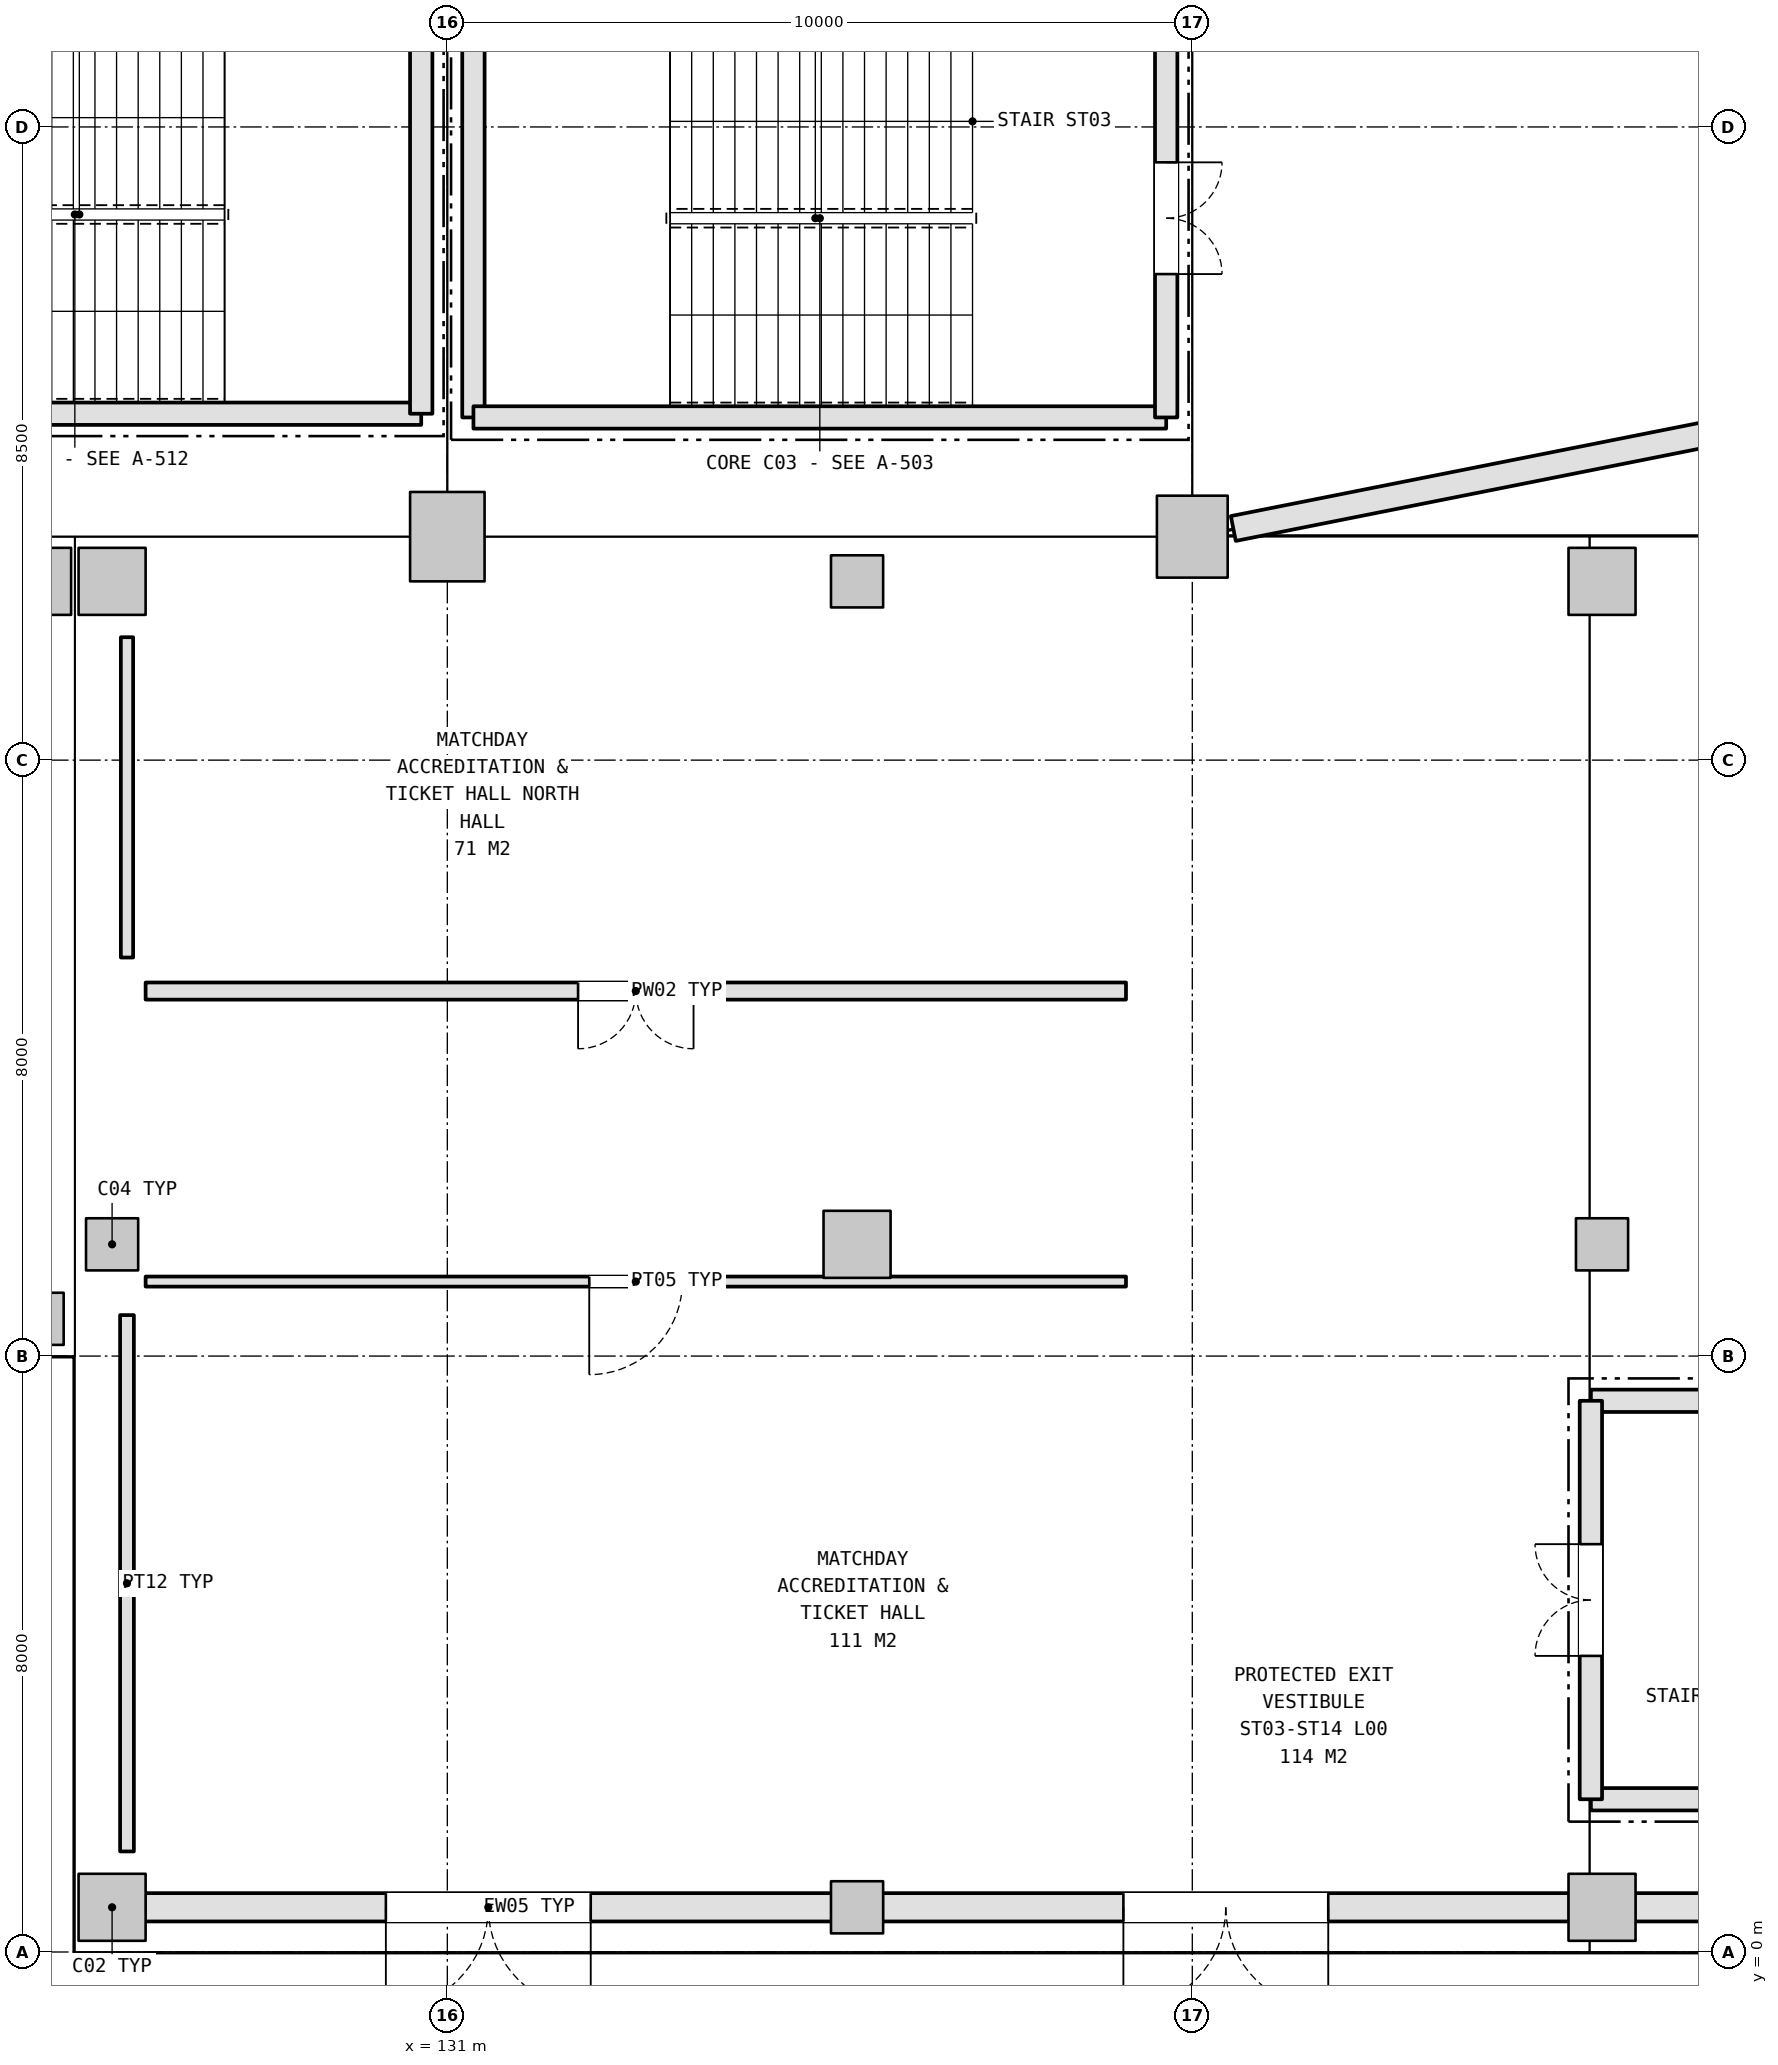
"""IFC4 building model, lengths in metres.
Left out: names, types, materials, properties, quantities, classifications, styles, units other than length and angle.
Written with IfcOpenShell. Run it as: python <this file> out.ifc"""

import sys

from ifc_helpers import new_model, si_unit, direction, frame, frame_2d, origin, origin_2d, place, context, subcontext, project, spatial, rectangle, extrude, element, fill, save


model = new_model("IFC4")
c1 = context("Model", 3, precision=1e-05, world=origin(), true_north=direction((0.0, 1.0)))
c2 = subcontext(c1, "Body", "Model", "MODEL_VIEW")
j1 = project(units=[si_unit("LENGTHUNIT", "METRE"), si_unit("PLANEANGLEUNIT", "RADIAN")], contexts=[c1])
p1 = place(None, origin())
s1 = spatial("IfcSite", under=j1, at=p1, CompositionType="ELEMENT")
p2 = place(p1, origin())
s2 = spatial("IfcBuilding", under=s1, at=p2, CompositionType="ELEMENT")
p3 = place(p2, origin())
s3 = spatial("IfcBuildingStorey", under=s2, at=p3, CompositionType="ELEMENT", Elevation=0.0)
p4 = place(p3, frame((131.0, 19.0, 0.0), z_axis=(0.0, 0.0, 1.0), x_axis=(1.0, 0.0, 0.0)))
e1 = element("IfcColumn", 1, at=p4, inside=s3, PredefinedType="COLUMN", context=c2, shape_type="SweptSolid", body=[
    extrude(rectangle(XDim=1.0, YDim=1.2, at=origin_2d()), origin(), (0.0, 0.0, 1.0), 5.4),
])
p5 = place(p3, frame((141.0, 19.0, 0.0), z_axis=(0.0, 0.0, 1.0), x_axis=(1.0, 0.0, 0.0)))
e2 = element("IfcColumn", 2, at=p5, inside=s3, PredefinedType="COLUMN", context=c2, shape_type="SweptSolid", body=[
    extrude(rectangle(XDim=0.95, YDim=1.1, at=origin_2d()), origin(), (0.0, 0.0, 1.0), 5.4),
])
p6 = place(p3, frame((126.5, 0.6, 0.0), z_axis=(0.0, 0.0, 1.0), x_axis=(1.0, 0.0, 0.0)))
e3 = element("IfcColumn", 3, at=p6, inside=s3, PredefinedType="COLUMN", context=c2, shape_type="SweptSolid", body=[
    extrude(rectangle(XDim=0.9, YDim=0.9, at=origin_2d()), origin(), (0.0, 0.0, 1.0), 5.4),
])
p7 = place(p3, frame((126.5, 9.5, 0.0), z_axis=(0.0, 0.0, 1.0), x_axis=(1.0, 0.0, 0.0)))
e4 = element("IfcColumn", 4, at=p7, inside=s3, PredefinedType="COLUMN", context=c2, shape_type="SweptSolid", body=[
    extrude(rectangle(XDim=0.7, YDim=0.7, at=origin_2d()), origin(), (0.0, 0.0, 1.0), 5.4),
])
p8 = place(p3, frame((126.5, 18.4, 0.0), z_axis=(0.0, 0.0, 1.0), x_axis=(1.0, 0.0, 0.0)))
e5 = element("IfcColumn", 5, at=p8, inside=s3, PredefinedType="COLUMN", context=c2, shape_type="SweptSolid", body=[
    extrude(rectangle(XDim=0.9, YDim=0.9, at=origin_2d()), origin(), (0.0, 0.0, 1.0), 5.4),
])
p9 = place(p3, frame((136.5, 0.6, 0.0), z_axis=(0.0, 0.0, 1.0), x_axis=(1.0, 0.0, 0.0)))
e6 = element("IfcColumn", 6, at=p9, inside=s3, PredefinedType="COLUMN", context=c2, shape_type="SweptSolid", body=[
    extrude(rectangle(XDim=0.7, YDim=0.7, at=origin_2d()), origin(), (0.0, 0.0, 1.0), 5.4),
])
p10 = place(p3, frame((136.5, 9.5, 0.0), z_axis=(0.0, 0.0, 1.0), x_axis=(1.0, 0.0, 0.0)))
e7 = element("IfcColumn", 7, at=p10, inside=s3, PredefinedType="COLUMN", context=c2, shape_type="SweptSolid", body=[
    extrude(rectangle(XDim=0.9, YDim=0.9, at=origin_2d()), origin(), (0.0, 0.0, 1.0), 5.4),
])
p11 = place(p3, frame((136.5, 18.4, 0.0), z_axis=(0.0, 0.0, 1.0), x_axis=(1.0, 0.0, 0.0)))
e8 = element("IfcColumn", 8, at=p11, inside=s3, PredefinedType="COLUMN", context=c2, shape_type="SweptSolid", body=[
    extrude(rectangle(XDim=0.7, YDim=0.7, at=origin_2d()), origin(), (0.0, 0.0, 1.0), 5.4),
])
p12 = place(p3, frame((146.5, 0.6, 0.0), z_axis=(0.0, 0.0, 1.0), x_axis=(1.0, 0.0, 0.0)))
e9 = element("IfcColumn", 9, at=p12, inside=s3, PredefinedType="COLUMN", context=c2, shape_type="SweptSolid", body=[
    extrude(rectangle(XDim=0.9, YDim=0.9, at=origin_2d()), origin(), (0.0, 0.0, 1.0), 5.4),
])
p13 = place(p3, frame((146.5, 9.5, 0.0), z_axis=(0.0, 0.0, 1.0), x_axis=(1.0, 0.0, 0.0)))
e10 = element("IfcColumn", 10, at=p13, inside=s3, PredefinedType="COLUMN", context=c2, shape_type="SweptSolid", body=[
    extrude(rectangle(XDim=0.7, YDim=0.7, at=origin_2d()), origin(), (0.0, 0.0, 1.0), 5.4),
])
p14 = place(p3, frame((146.5, 18.4, 0.0), z_axis=(0.0, 0.0, 1.0), x_axis=(1.0, 0.0, 0.0)))
e11 = element("IfcColumn", 11, at=p14, inside=s3, PredefinedType="COLUMN", context=c2, shape_type="SweptSolid", body=[
    extrude(rectangle(XDim=0.9, YDim=0.9, at=origin_2d()), origin(), (0.0, 0.0, 1.0), 5.4),
])
p15 = place(p3, frame((125.5, 8.5, 0.0), z_axis=(0.0, 0.0, 1.0), x_axis=(1.0, 0.0, 0.0)))
e12 = element("IfcColumn", 12, at=p15, inside=s3, PredefinedType="COLUMN", context=c2, shape_type="SweptSolid", body=[
    extrude(rectangle(XDim=0.7, YDim=0.7, at=origin_2d()), origin(), (0.0, 0.0, 1.0), 5.4),
])
p16 = place(p3, frame((125.5, 18.4, 0.0), z_axis=(0.0, 0.0, 1.0), x_axis=(1.0, 0.0, 0.0)))
e13 = element("IfcColumn", 13, at=p16, inside=s3, PredefinedType="COLUMN", context=c2, shape_type="SweptSolid", body=[
    extrude(rectangle(XDim=0.9, YDim=0.9, at=origin_2d()), origin(), (0.0, 0.0, 1.0), 5.4),
])
p17 = place(p3, frame((141.55, 19.11, 0.0), z_axis=(0.0, 0.0, 1.0), x_axis=(0.980787488403, 0.195079221324, 0.0)))
e14 = element("IfcWall", 14, at=p17, inside=s3, PredefinedType="SOLIDWALL", context=c2, shape_type="SweptSolid", body=[
    extrude(rectangle(XDim=19.246, YDim=0.34, at=frame_2d((9.623, 0.0))), origin(), (0.0, 0.0, 1.0), 4.275),
])
p18 = place(p17, frame((8.823, 0.0, 2.4)))
e15 = element("IfcOpeningElement", 15, at=p18, cuts=e14, PredefinedType="OPENING", context=c2, shape_type="SweptSolid", body=[
    extrude(rectangle(XDim=1.6, YDim=1.2, at=frame_2d((0.8, 0.6))), frame((0.0, 0.18, 0.0), z_axis=(0.0, -1.0, 0.0), x_axis=(1.0, 0.0, 0.0)), (0.0, 0.0, 1.0), 0.36),
])
p19 = place(p3, frame((126.938, 0.6, 0.0), z_axis=(0.0, 0.0, 1.0), x_axis=(1.0, 0.0, 0.0)))
e16 = element("IfcWall", 16, at=p19, inside=s3, PredefinedType="SOLIDWALL", context=c2, shape_type="SweptSolid", body=[
    extrude(rectangle(XDim=9.224, YDim=0.38, at=frame_2d((4.612, 0.0))), origin(), (0.0, 0.0, 1.0), 4.425),
])
p20 = place(p19, frame((3.237, 0.0, 0.0)))
e17 = element("IfcOpeningElement", 17, at=p20, cuts=e16, PredefinedType="OPENING", context=c2, shape_type="SweptSolid", body=[
    extrude(rectangle(XDim=2.75, YDim=2.4, at=frame_2d((1.375, 1.2))), frame((0.0, 0.2, 0.0), z_axis=(0.0, -1.0, 0.0), x_axis=(1.0, 0.0, 0.0)), (0.0, 0.0, 1.0), 0.4),
])
p21 = place(p3, frame((136.838, 0.6, 0.0), z_axis=(0.0, 0.0, 1.0), x_axis=(1.0, 0.0, 0.0)))
e18 = element("IfcWall", 18, at=p21, inside=s3, PredefinedType="SOLIDWALL", context=c2, shape_type="SweptSolid", body=[
    extrude(rectangle(XDim=9.224, YDim=0.38, at=frame_2d((4.612, 0.0))), origin(), (0.0, 0.0, 1.0), 4.425),
])
p22 = place(p21, frame((3.237, 0.0, 0.0)))
e19 = element("IfcOpeningElement", 19, at=p22, cuts=e18, PredefinedType="OPENING", context=c2, shape_type="SweptSolid", body=[
    extrude(rectangle(XDim=2.75, YDim=2.4, at=frame_2d((1.375, 1.2))), frame((0.0, 0.2, 0.0), z_axis=(0.0, -1.0, 0.0), x_axis=(1.0, 0.0, 0.0)), (0.0, 0.0, 1.0), 0.4),
])
p23 = place(p3, frame((146.938, 0.6, 0.0), z_axis=(0.0, 0.0, 1.0), x_axis=(1.0, 0.0, 0.0)))
e20 = element("IfcWall", 20, at=p23, inside=s3, PredefinedType="SOLIDWALL", context=c2, shape_type="SweptSolid", body=[
    extrude(rectangle(XDim=9.224, YDim=0.38, at=frame_2d((4.612, 0.0))), origin(), (0.0, 0.0, 1.0), 4.425),
])
p24 = place(p23, frame((3.237, 0.0, 0.0)))
e21 = element("IfcOpeningElement", 21, at=p24, cuts=e20, PredefinedType="OPENING", context=c2, shape_type="SweptSolid", body=[
    extrude(rectangle(XDim=2.75, YDim=2.4, at=frame_2d((1.375, 1.2))), frame((0.0, 0.2, 0.0), z_axis=(0.0, -1.0, 0.0), x_axis=(1.0, 0.0, 0.0)), (0.0, 0.0, 1.0), 0.4),
])
p25 = place(p3, frame((131.35, 25.95, 0.0), z_axis=(0.0, 0.0, 1.0), x_axis=(0.0, -1.0, 0.0)))
e22 = element("IfcWall", 22, at=p25, inside=s3, PredefinedType="SHEAR", context=c2, shape_type="SweptSolid", body=[
    extrude(rectangle(XDim=5.349, YDim=0.3, at=frame_2d((2.675, 0.0))), origin(), (0.0, 0.0, 1.0), 5.14),
])
p26 = place(p3, frame((131.35, 20.6, 0.0), z_axis=(0.0, 0.0, 1.0), x_axis=(1.0, 0.0, 0.0)))
e23 = element("IfcWall", 23, at=p26, inside=s3, PredefinedType="SHEAR", context=c2, shape_type="SweptSolid", body=[
    extrude(rectangle(XDim=9.299, YDim=0.3, at=frame_2d((4.65, 0.0))), origin(), (0.0, 0.0, 1.0), 5.14),
])
p27 = place(p3, frame((140.65, 20.6, 0.0), z_axis=(0.0, 0.0, 1.0), x_axis=(0.0, 1.0, 0.0)))
e24 = element("IfcWall", 24, at=p27, inside=s3, PredefinedType="SHEAR", context=c2, shape_type="SweptSolid", body=[
    extrude(rectangle(XDim=5.349, YDim=0.3, at=frame_2d((2.675, 0.0))), origin(), (0.0, 0.0, 1.0), 5.14),
])
p28 = place(p27, frame((1.925, 0.0, 0.0)))
e25 = element("IfcOpeningElement", 25, at=p28, cuts=e24, PredefinedType="OPENING", context=c2, shape_type="SweptSolid", body=[
    extrude(rectangle(XDim=1.5, YDim=2.2, at=frame_2d((0.75, 1.1))), frame((0.0, 0.16, 0.0), z_axis=(0.0, -1.0, 0.0), x_axis=(1.0, 0.0, 0.0)), (0.0, 0.0, 1.0), 0.32),
])
p29 = place(p3, frame((121.35, 20.65, 0.0), z_axis=(0.0, 0.0, 1.0), x_axis=(1.0, 0.0, 0.0)))
e26 = element("IfcWall", 26, at=p29, inside=s3, PredefinedType="SHEAR", context=c2, shape_type="SweptSolid", body=[
    extrude(rectangle(XDim=9.299, YDim=0.3, at=frame_2d((4.65, 0.0))), origin(), (0.0, 0.0, 1.0), 5.14),
])
p30 = place(p3, frame((130.65, 20.65, 0.0), z_axis=(0.0, 0.0, 1.0), x_axis=(0.0, 1.0, 0.0)))
e27 = element("IfcWall", 27, at=p30, inside=s3, PredefinedType="SHEAR", context=c2, shape_type="SweptSolid", body=[
    extrude(rectangle(XDim=5.349, YDim=0.3, at=frame_2d((2.675, 0.0))), origin(), (0.0, 0.0, 1.0), 5.14),
])
for number, where, z_axis, x_axis in (
    (28, (146.35, 2.05, 0.0), (0.0, 0.0, 1.0), (1.0, 0.0, 0.0)),
    (29, (155.65, 7.4, 0.0), (0.0, 0.0, 1.0), (-1.0, 0.0, 0.0)),
):
    element("IfcWall", number, at=place(p3, frame(where, z_axis=z_axis, x_axis=x_axis)), inside=s3, PredefinedType="SHEAR", context=c2, shape_type="SweptSolid", body=[
        extrude(rectangle(XDim=9.299, YDim=0.3, at=frame_2d((4.65, 0.0))), origin(), (0.0, 0.0, 1.0), 5.14),
    ])
p31 = place(p3, frame((146.35, 7.4, 0.0), z_axis=(0.0, 0.0, 1.0), x_axis=(0.0, -1.0, 0.0)))
e30 = element("IfcWall", 30, at=p31, inside=s3, PredefinedType="SHEAR", context=c2, shape_type="SweptSolid", body=[
    extrude(rectangle(XDim=5.349, YDim=0.3, at=frame_2d((2.675, 0.0))), origin(), (0.0, 0.0, 1.0), 5.14),
])
p32 = place(p31, frame((1.925, 0.0, 0.0)))
e31 = element("IfcOpeningElement", 31, at=p32, cuts=e30, PredefinedType="OPENING", context=c2, shape_type="SweptSolid", body=[
    extrude(rectangle(XDim=1.5, YDim=2.2, at=frame_2d((0.75, 1.1))), frame((0.0, 0.16, 0.0), z_axis=(0.0, -1.0, 0.0), x_axis=(1.0, 0.0, 0.0)), (0.0, 0.0, 1.0), 0.32),
])
p33 = place(p3, frame((126.95, 9.0, 0.0), z_axis=(0.0, 0.0, 1.0), x_axis=(1.0, 0.0, 0.0)))
e32 = element("IfcWall", 32, at=p33, inside=s3, PredefinedType="PARTITIONING", context=c2, shape_type="SweptSolid", body=[
    extrude(rectangle(XDim=13.16, YDim=0.135, at=frame_2d((6.58, 0.0))), origin(), (0.0, 0.0, 1.0), 4.425),
])
p34 = place(p33, frame((5.955, 0.0, 0.0)))
e33 = element("IfcOpeningElement", 33, at=p34, cuts=e32, PredefinedType="OPENING", context=c2, shape_type="SweptSolid", body=[
    extrude(rectangle(XDim=1.25, YDim=2.2, at=frame_2d((0.625, 1.1))), frame((0.0, 0.077, 0.0), z_axis=(0.0, -1.0, 0.0), x_axis=(1.0, 0.0, 0.0)), (0.0, 0.0, 1.0), 0.155),
])
p35 = place(p3, frame((126.7, 1.35, 0.0), z_axis=(0.0, 0.0, 1.0), x_axis=(0.0, 1.0, 0.0)))
e34 = element("IfcWall", 34, at=p35, inside=s3, PredefinedType="PARTITIONING", context=c2, shape_type="SweptSolid", body=[
    extrude(rectangle(XDim=7.2, YDim=0.185, at=frame_2d((3.6, 0.0))), origin(), (0.0, 0.0, 1.0), 4.475),
])
p36 = place(p3, frame((140.11, 12.9, 0.0), z_axis=(0.0, 0.0, 1.0), x_axis=(-1.0, 0.0, 0.0)))
e35 = element("IfcWall", 35, at=p36, inside=s3, PredefinedType="PLUMBINGWALL", context=c2, shape_type="SweptSolid", body=[
    extrude(rectangle(XDim=13.16, YDim=0.23, at=frame_2d((6.58, 0.0))), origin(), (0.0, 0.0, 1.0), 4.425),
])
p37 = place(p36, frame((5.805, 0.0, 0.0)))
e36 = element("IfcOpeningElement", 36, at=p37, cuts=e35, PredefinedType="OPENING", context=c2, shape_type="SweptSolid", body=[
    extrude(rectangle(XDim=1.55, YDim=2.15, at=frame_2d((0.775, 1.075))), frame((0.0, 0.125, 0.0), z_axis=(0.0, -1.0, 0.0), x_axis=(1.0, 0.0, 0.0)), (0.0, 0.0, 1.0), 0.25),
])
p38 = place(p3, frame((126.7, 13.35, 0.0), z_axis=(0.0, 0.0, 1.0), x_axis=(0.0, 1.0, 0.0)))
e37 = element("IfcWall", 37, at=p38, inside=s3, PredefinedType="PARTITIONING", context=c2, shape_type="SweptSolid", body=[
    extrude(rectangle(XDim=4.3, YDim=0.165, at=frame_2d((2.15, 0.0))), origin(), (0.0, 0.0, 1.0), 4.475),
])
p39 = place(p20, frame((2.75, 0.0, 0.0), z_axis=(0.0, 0.0, 1.0), x_axis=(-1.0, 0.0, 0.0)))
e38 = element("IfcDoor", 38, at=p39, inside=s3, OperationType="DOUBLE_DOOR_SINGLE_SWING", PredefinedType="DOOR", context=c2, shape_type="SweptSolid", body=[
    extrude(rectangle(XDim=2.75, YDim=2.4, at=frame_2d((1.375, 1.2))), frame((0.0, 0.025, 0.0), z_axis=(0.0, -1.0, 0.0), x_axis=(1.0, 0.0, 0.0)), (0.0, 0.0, 1.0), 0.05),
])
fill(e17, e38)
p40 = place(p22, frame((2.75, 0.0, 0.0), z_axis=(0.0, 0.0, 1.0), x_axis=(-1.0, 0.0, 0.0)))
e39 = element("IfcDoor", 39, at=p40, inside=s3, OperationType="DOUBLE_DOOR_SINGLE_SWING", PredefinedType="DOOR", context=c2, shape_type="SweptSolid", body=[
    extrude(rectangle(XDim=2.75, YDim=2.4, at=frame_2d((1.375, 1.2))), frame((0.0, 0.025, 0.0), z_axis=(0.0, -1.0, 0.0), x_axis=(1.0, 0.0, 0.0)), (0.0, 0.0, 1.0), 0.05),
])
fill(e19, e39)
p41 = place(p28, frame((1.5, 0.0, 0.0), z_axis=(0.0, 0.0, 1.0), x_axis=(-1.0, 0.0, 0.0)))
e40 = element("IfcDoor", 40, at=p41, inside=s3, OperationType="DOUBLE_DOOR_SINGLE_SWING", PredefinedType="DOOR", context=c2, shape_type="SweptSolid", body=[
    extrude(rectangle(XDim=1.5, YDim=2.2, at=frame_2d((0.75, 1.1))), frame((0.0, 0.025, 0.0), z_axis=(0.0, -1.0, 0.0), x_axis=(1.0, 0.0, 0.0)), (0.0, 0.0, 1.0), 0.05),
])
fill(e25, e40)
p42 = place(p32, frame((1.5, 0.0, 0.0), z_axis=(0.0, 0.0, 1.0), x_axis=(-1.0, 0.0, 0.0)))
e41 = element("IfcDoor", 41, at=p42, inside=s3, OperationType="DOUBLE_DOOR_SINGLE_SWING", PredefinedType="DOOR", context=c2, shape_type="SweptSolid", body=[
    extrude(rectangle(XDim=1.5, YDim=2.2, at=frame_2d((0.75, 1.1))), frame((0.0, 0.025, 0.0), z_axis=(0.0, -1.0, 0.0), x_axis=(1.0, 0.0, 0.0)), (0.0, 0.0, 1.0), 0.05),
])
fill(e31, e41)
p43 = place(p34, frame((1.25, 0.0, 0.0), z_axis=(0.0, 0.0, 1.0), x_axis=(-1.0, 0.0, 0.0)))
e42 = element("IfcDoor", 42, at=p43, inside=s3, OperationType="SINGLE_SWING_LEFT", PredefinedType="DOOR", context=c2, shape_type="SweptSolid", body=[
    extrude(rectangle(XDim=1.25, YDim=2.2, at=frame_2d((0.625, 1.1))), frame((0.0, 0.025, 0.0), z_axis=(0.0, -1.0, 0.0), x_axis=(1.0, 0.0, 0.0)), (0.0, 0.0, 1.0), 0.05),
])
fill(e33, e42)
p44 = place(p37, origin())
e43 = element("IfcDoor", 43, at=p44, inside=s3, OperationType="DOUBLE_DOOR_SINGLE_SWING", PredefinedType="DOOR", context=c2, shape_type="SweptSolid", body=[
    extrude(rectangle(XDim=1.55, YDim=2.15, at=frame_2d((0.775, 1.075))), frame((0.0, 0.025, 0.0), z_axis=(0.0, -1.0, 0.0), x_axis=(1.0, 0.0, 0.0)), (0.0, 0.0, 1.0), 0.05),
])
fill(e36, e43)
save(model, sys.argv[1])
